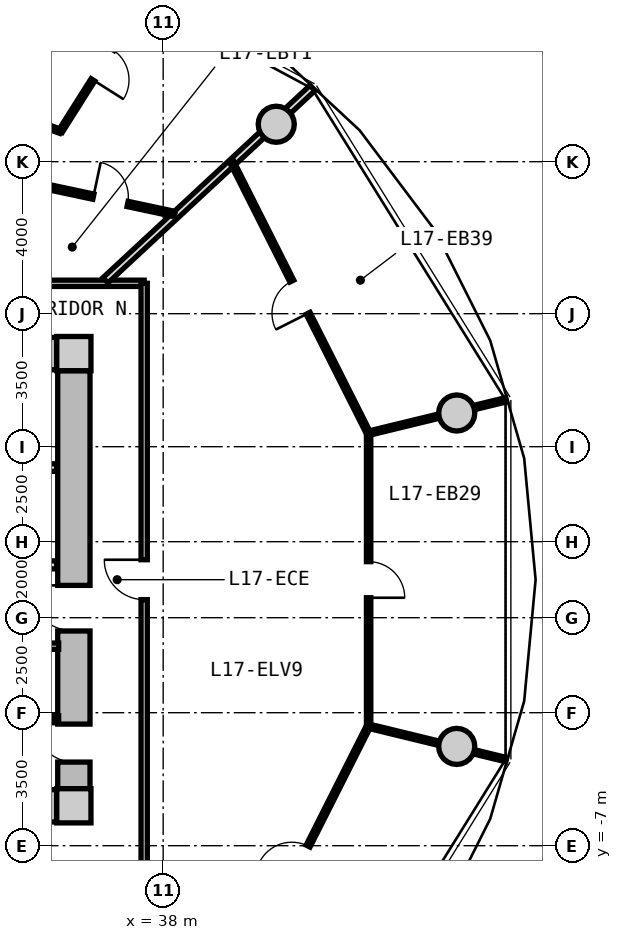
"""IFC4 building model, lengths in metres.
Left out: names, types, materials, properties, quantities, classifications, styles, units other than length and angle.
Written with IfcOpenShell. Run it as: python <this file> out.ifc"""

import sys

from ifc_helpers import new_model, si_unit, direction, frame, frame_2d, origin, origin_2d, place, context, subcontext, project, spatial, rectangle, circle, extrude, source, transform, mapped, element, fill, save


model = new_model("IFC4")
c1 = context("Model", 3, precision=1e-05, world=origin(), true_north=direction((0.0, 1.0)))
c2 = subcontext(c1, "Body", "Model", "MODEL_VIEW")
j1 = project(units=[si_unit("LENGTHUNIT", "METRE"), si_unit("PLANEANGLEUNIT", "RADIAN")], contexts=[c1])
p1 = place(None, origin())
s1 = spatial("IfcSite", under=j1, at=p1, CompositionType="ELEMENT")
p2 = place(p1, origin())
s2 = spatial("IfcBuilding", under=s1, at=p2, CompositionType="ELEMENT")
p3 = place(p2, frame((0.0, 0.0, 58.2)))
s3 = spatial("IfcBuildingStorey", under=s2, at=p3, CompositionType="ELEMENT", Elevation=58.2)
m1 = source(origin(), c2, "Body", "SweptSolid", [
    extrude(rectangle(XDim=0.9, YDim=0.9, at=origin_2d()), origin(), (0.0, 0.0, 1.0), 3.05),
])
for number, where, z_axis, x_axis in (
    (1, (35.65, -5.95, 0.0), (0.0, 0.0, 1.0), (1.0, 0.0, 0.0)),
    (2, (35.65, 5.95, 0.0), (0.0, 0.0, 1.0), (1.0, 0.0, 0.0)),
):
    element("IfcColumn", number, at=place(p3, frame(where, z_axis=z_axis, x_axis=x_axis)), inside=s3, PredefinedType="COLUMN", context=c2, shape_type="MappedRepresentation", body=[
        mapped(m1, transform((0.0, 0.0, 0.0), x_axis=(1.0, 0.0, 0.0), y_axis=(0.0, 1.0, 0.0), z_axis=(0.0, 0.0, 1.0), scale=1.0)),
    ])
m2 = source(origin(), c2, "Body", "SweptSolid", [
    extrude(rectangle(XDim=14.4, YDim=0.85, at=frame_2d((7.2, 0.0))), origin(), (0.0, 0.0, 1.0), 2.79),
])
for number, where, z_axis, x_axis in (
    (3, (20.8, 5.95, 0.0), (0.0, 0.0, 1.0), (1.0, 0.0, 0.0)),
    (4, (35.2, -5.95, 0.0), (0.0, 0.0, 1.0), (-1.0, 0.0, 0.0)),
):
    element("IfcWall", number, at=place(p3, frame(where, z_axis=z_axis, x_axis=x_axis)), inside=s3, PredefinedType="SHEAR", context=c2, shape_type="MappedRepresentation", body=[
        mapped(m2, transform((0.0, 0.0, 0.0), x_axis=(1.0, 0.0, 0.0), y_axis=(0.0, 1.0, 0.0), z_axis=(0.0, 0.0, 1.0), scale=1.0)),
    ])
m3 = source(origin(), c2, "Body", "SweptSolid", [
    extrude(rectangle(XDim=11.0, YDim=0.85, at=frame_2d((5.5, 0.0))), origin(), (0.0, 0.0, 1.0), 2.79),
])
p4 = place(p3, frame((35.65, 5.5, 0.0), z_axis=(0.0, 0.0, 1.0), x_axis=(0.0, -1.0, 0.0)))
e5 = element("IfcWall", 5, at=p4, inside=s3, PredefinedType="SHEAR", context=c2, shape_type="MappedRepresentation", body=[
    mapped(m3, transform((0.0, 0.0, 0.0), x_axis=(1.0, 0.0, 0.0), y_axis=(0.0, 1.0, 0.0), z_axis=(0.0, 0.0, 1.0), scale=1.0)),
])
p5 = place(p4, frame((5.65, 0.0, 0.0)))
e6 = element("IfcOpeningElement", 6, at=p5, cuts=e5, PredefinedType="OPENING", context=c2, shape_type="SweptSolid", body=[
    extrude(rectangle(XDim=1.2, YDim=2.15, at=frame_2d((0.6, 1.075))), frame((0.0, 0.435, 0.0), z_axis=(0.0, -1.0, 0.0), x_axis=(1.0, 0.0, 0.0)), (0.0, 0.0, 1.0), 0.87),
])
p6 = place(p4, frame((9.3, 0.0, 0.0)))
e7 = element("IfcOpeningElement", 7, at=p6, cuts=e5, PredefinedType="OPENING", context=c2, shape_type="SweptSolid", body=[
    extrude(rectangle(XDim=1.0, YDim=2.1, at=frame_2d((0.5, 1.05))), frame((0.0, 0.435, 0.0), z_axis=(0.0, -1.0, 0.0), x_axis=(1.0, 0.0, 0.0)), (0.0, 0.0, 1.0), 0.87),
])
m4 = source(origin(), c2, "Body", "SweptSolid", [
    extrude(circle(Radius=0.475, at=origin_2d()), origin(), (0.0, 0.0, 1.0), 3.05),
])
for number, where, z_axis, x_axis in (
    (8, (45.725, 4.387, 0.0), (0.0, 0.0, 1.0), (1.0, 0.0, 0.0)),
    (9, (40.975, 11.985, 0.0), (0.0, 0.0, 1.0), (1.0, 0.0, 0.0)),
    (10, (45.725, -4.387, 0.0), (0.0, 0.0, 1.0), (1.0, 0.0, 0.0)),
):
    element("IfcColumn", number, at=place(p3, frame(where, z_axis=z_axis, x_axis=x_axis)), inside=s3, PredefinedType="COLUMN", context=c2, shape_type="MappedRepresentation", body=[
        mapped(m4, transform((0.0, 0.0, 0.0), x_axis=(1.0, 0.0, 0.0), y_axis=(0.0, 1.0, 0.0), z_axis=(0.0, 0.0, 1.0), scale=1.0)),
    ])
m5 = source(origin(), c2, "Body", "SweptSolid", [
    extrude(rectangle(XDim=3.2, YDim=0.2, at=frame_2d((1.6, 0.0))), origin(), (0.0, 0.0, 1.0), 2.775),
])
p7 = place(p3, frame((32.0, 2.95, 0.0), z_axis=(0.0, 0.0, 1.0), x_axis=(1.0, 0.0, 0.0)))
e11 = element("IfcWall", 11, at=p7, inside=s3, PredefinedType="PARTITIONING", context=c2, shape_type="MappedRepresentation", body=[
    mapped(m5, transform((0.0, 0.0, 0.0), x_axis=(1.0, 0.0, 0.0), y_axis=(0.0, 1.0, 0.0), z_axis=(0.0, 0.0, 1.0), scale=1.0)),
])
m6 = source(origin(), c2, "Body", "SweptSolid", [
    extrude(rectangle(XDim=6.66, YDim=0.21, at=frame_2d((3.33, 0.0))), origin(), (0.0, 0.0, 1.0), 2.775),
])
p8 = place(p3, frame((28.54, 0.39, 0.0), z_axis=(0.0, 0.0, 1.0), x_axis=(1.0, 0.0, 0.0)))
e12 = element("IfcWall", 12, at=p8, inside=s3, PredefinedType="PARTITIONING", context=c2, shape_type="MappedRepresentation", body=[
    mapped(m6, transform((0.0, 0.0, 0.0), x_axis=(1.0, 0.0, 0.0), y_axis=(0.0, 1.0, 0.0), z_axis=(0.0, 0.0, 1.0), scale=1.0)),
])
p9 = place(p8, frame((1.0, 0.0, 0.0)))
e13 = element("IfcOpeningElement", 13, at=p9, cuts=e12, PredefinedType="OPENING", context=c2, shape_type="SweptSolid", body=[
    extrude(rectangle(XDim=1.2, YDim=2.15, at=frame_2d((0.6, 1.075))), frame((0.0, 0.115, 0.0), z_axis=(0.0, -1.0, 0.0), x_axis=(1.0, 0.0, 0.0)), (0.0, 0.0, 1.0), 0.23),
])
m7 = source(origin(), c2, "Body", "SweptSolid", [
    extrude(rectangle(XDim=2.7, YDim=0.165, at=frame_2d((1.35, 0.0))), origin(), (0.0, 0.0, 1.0), 2.775),
])
p10 = place(p3, frame((32.55, -1.75, 0.0), z_axis=(0.0, 0.0, 1.0), x_axis=(1.0, 0.0, 0.0)))
e14 = element("IfcWall", 14, at=p10, inside=s3, PredefinedType="PARTITIONING", context=c2, shape_type="MappedRepresentation", body=[
    mapped(m7, transform((0.0, 0.0, 0.0), x_axis=(1.0, 0.0, 0.0), y_axis=(0.0, 1.0, 0.0), z_axis=(0.0, 0.0, 1.0), scale=1.0)),
])
p11 = place(p10, frame((0.85, 0.0, 0.0)))
e15 = element("IfcOpeningElement", 15, at=p11, cuts=e14, PredefinedType="OPENING", context=c2, shape_type="SweptSolid", body=[
    extrude(rectangle(XDim=0.925, YDim=2.1, at=frame_2d((0.462, 1.05))), frame((0.0, 0.093, 0.0), z_axis=(0.0, -1.0, 0.0), x_axis=(1.0, 0.0, 0.0)), (0.0, 0.0, 1.0), 0.185),
])
m8 = source(origin(), c2, "Body", "SweptSolid", [
    extrude(rectangle(XDim=2.7, YDim=0.14, at=frame_2d((1.35, 0.0))), origin(), (0.0, 0.0, 1.0), 2.775),
])
p12 = place(p3, frame((32.55, -3.65, 0.0), z_axis=(0.0, 0.0, 1.0), x_axis=(1.0, 0.0, 0.0)))
e16 = element("IfcWall", 16, at=p12, inside=s3, PredefinedType="PARTITIONING", context=c2, shape_type="MappedRepresentation", body=[
    mapped(m8, transform((0.0, 0.0, 0.0), x_axis=(1.0, 0.0, 0.0), y_axis=(0.0, 1.0, 0.0), z_axis=(0.0, 0.0, 1.0), scale=1.0)),
])
m9 = source(origin(), c2, "Body", "SweptSolid", [
    extrude(rectangle(XDim=19.0, YDim=0.165, at=frame_2d((9.5, 0.0))), origin(), (0.0, 0.0, 1.0), 2.775),
])
p13 = place(p3, frame((18.5, 7.8, 0.0), z_axis=(0.0, 0.0, 1.0), x_axis=(1.0, 0.0, 0.0)))
e17 = element("IfcWall", 17, at=p13, inside=s3, PredefinedType="PARTITIONING", context=c2, shape_type="MappedRepresentation", body=[
    mapped(m9, transform((0.0, 0.0, 0.0), x_axis=(1.0, 0.0, 0.0), y_axis=(0.0, 1.0, 0.0), z_axis=(0.0, 0.0, 1.0), scale=1.0)),
])
p14 = place(p13, frame((6.961, 0.0, 0.0)))
e18 = element("IfcOpeningElement", 18, at=p14, cuts=e17, PredefinedType="OPENING", context=c2, shape_type="SweptSolid", body=[
    extrude(rectangle(XDim=1.05, YDim=2.15, at=frame_2d((0.525, 1.075))), frame((0.0, 0.093, 0.0), z_axis=(0.0, -1.0, 0.0), x_axis=(1.0, 0.0, 0.0)), (0.0, 0.0, 1.0), 0.185),
])
m10 = source(origin(), c2, "Body", "SweptSolid", [
    extrude(rectangle(XDim=15.6, YDim=0.165, at=frame_2d((7.8, 0.0))), origin(), (0.0, 0.0, 1.0), 2.775),
])
p15 = place(p3, frame((37.5, 7.8, 0.0), z_axis=(0.0, 0.0, 1.0), x_axis=(0.0, -1.0, 0.0)))
e19 = element("IfcWall", 19, at=p15, inside=s3, PredefinedType="PARTITIONING", context=c2, shape_type="MappedRepresentation", body=[
    mapped(m10, transform((0.0, 0.0, 0.0), x_axis=(1.0, 0.0, 0.0), y_axis=(0.0, 1.0, 0.0), z_axis=(0.0, 0.0, 1.0), scale=1.0)),
])
p16 = place(p15, frame((7.275, 0.0, 0.0)))
e20 = element("IfcOpeningElement", 20, at=p16, cuts=e19, PredefinedType="OPENING", context=c2, shape_type="SweptSolid", body=[
    extrude(rectangle(XDim=1.05, YDim=2.15, at=frame_2d((0.525, 1.075))), frame((0.0, 0.093, 0.0), z_axis=(0.0, -1.0, 0.0), x_axis=(1.0, 0.0, 0.0)), (0.0, 0.0, 1.0), 0.185),
])
m11 = source(origin(), c2, "Body", "SweptSolid", [
    extrude(rectangle(XDim=7.435, YDim=0.19, at=frame_2d((3.717, 0.0))), origin(), (0.0, 0.0, 1.0), 2.225),
])
p17 = place(p3, frame((36.483, 7.88, 0.0), z_axis=(0.0, 0.0, 1.0), x_axis=(0.732651956848, 0.680603489652, 0.0)))
e21 = element("IfcWall", 21, at=p17, inside=s3, PredefinedType="PARTITIONING", context=c2, shape_type="MappedRepresentation", body=[
    mapped(m11, transform((0.0, 0.0, 0.0), x_axis=(1.0, 0.0, 0.0), y_axis=(0.0, 1.0, 0.0), z_axis=(0.0, 0.0, 1.0), scale=1.0)),
])
m12 = source(origin(), c2, "Body", "SweptSolid", [
    extrude(rectangle(XDim=8.018, YDim=0.115, at=frame_2d((4.009, 0.0))), origin(), (0.0, 0.0, 1.0), 2.775),
])
p18 = place(p3, frame((39.795, -11.014, 0.0), z_axis=(0.0, 0.0, 1.0), x_axis=(0.450134355233, 0.89296084026, 0.0)))
e22 = element("IfcWall", 22, at=p18, inside=s3, PredefinedType="PARTITIONING", context=c2, shape_type="MappedRepresentation", body=[
    mapped(m12, transform((0.0, 0.0, 0.0), x_axis=(1.0, 0.0, 0.0), y_axis=(0.0, 1.0, 0.0), z_axis=(0.0, 0.0, 1.0), scale=1.0)),
])
p19 = place(p18, frame((3.534, 0.0, 0.0)))
e23 = element("IfcOpeningElement", 23, at=p19, cuts=e22, PredefinedType="OPENING", context=c2, shape_type="SweptSolid", body=[
    extrude(rectangle(XDim=0.95, YDim=2.1, at=frame_2d((0.475, 1.05))), frame((0.0, 0.067, 0.0), z_axis=(0.0, -1.0, 0.0), x_axis=(1.0, 0.0, 0.0)), (0.0, 0.0, 1.0), 0.135),
])
m13 = source(origin(), c2, "Body", "SweptSolid", [
    extrude(rectangle(XDim=7.709, YDim=0.115, at=frame_2d((3.855, 0.0))), origin(), (0.0, 0.0, 1.0), 2.775),
])
p20 = place(p3, frame((43.406, -3.855, 0.0), z_axis=(0.0, 0.0, 1.0), x_axis=(0.0, 1.0, 0.0)))
e24 = element("IfcWall", 24, at=p20, inside=s3, PredefinedType="PARTITIONING", context=c2, shape_type="MappedRepresentation", body=[
    mapped(m13, transform((0.0, 0.0, 0.0), x_axis=(1.0, 0.0, 0.0), y_axis=(0.0, 1.0, 0.0), z_axis=(0.0, 0.0, 1.0), scale=1.0)),
])
p21 = place(p20, frame((3.38, 0.0, 0.0)))
e25 = element("IfcOpeningElement", 25, at=p21, cuts=e24, PredefinedType="OPENING", context=c2, shape_type="SweptSolid", body=[
    extrude(rectangle(XDim=0.95, YDim=2.1, at=frame_2d((0.475, 1.05))), frame((0.0, 0.067, 0.0), z_axis=(0.0, -1.0, 0.0), x_axis=(1.0, 0.0, 0.0)), (0.0, 0.0, 1.0), 0.135),
])
m14 = source(origin(), c2, "Body", "SweptSolid", [
    extrude(rectangle(XDim=3.728, YDim=0.115, at=frame_2d((1.864, 0.0))), origin(), (0.0, 0.0, 1.0), 2.225),
])
p22 = place(p3, frame((43.406, -3.855, 0.0), z_axis=(0.0, 0.0, 1.0), x_axis=(0.971641177968, -0.236460189624, 0.0)))
e26 = element("IfcWall", 26, at=p22, inside=s3, PredefinedType="PARTITIONING", context=c2, shape_type="MappedRepresentation", body=[
    mapped(m14, transform((0.0, 0.0, 0.0), x_axis=(1.0, 0.0, 0.0), y_axis=(0.0, 1.0, 0.0), z_axis=(0.0, 0.0, 1.0), scale=1.0)),
])
p23 = place(p3, frame((43.404, 3.854, 0.0), z_axis=(0.0, 0.0, 1.0), x_axis=(-0.450134355233, 0.89296084026, 0.0)))
e27 = element("IfcWall", 27, at=p23, inside=s3, PredefinedType="PARTITIONING", context=c2, shape_type="MappedRepresentation", body=[
    mapped(m12, transform((0.0, 0.0, 0.0), x_axis=(1.0, 0.0, 0.0), y_axis=(0.0, 1.0, 0.0), z_axis=(0.0, 0.0, 1.0), scale=1.0)),
])
p24 = place(p23, frame((3.534, 0.0, 0.0)))
e28 = element("IfcOpeningElement", 28, at=p24, cuts=e27, PredefinedType="OPENING", context=c2, shape_type="SweptSolid", body=[
    extrude(rectangle(XDim=0.95, YDim=2.1, at=frame_2d((0.475, 1.05))), frame((0.0, 0.067, 0.0), z_axis=(0.0, -1.0, 0.0), x_axis=(1.0, 0.0, 0.0)), (0.0, 0.0, 1.0), 0.135),
])
m15 = source(origin(), c2, "Body", "SweptSolid", [
    extrude(rectangle(XDim=3.73, YDim=0.115, at=frame_2d((1.865, 0.0))), origin(), (0.0, 0.0, 1.0), 2.225),
])
p25 = place(p3, frame((43.404, 3.854, 0.0), z_axis=(0.0, 0.0, 1.0), x_axis=(0.971644038568, 0.236448434791, 0.0)))
e29 = element("IfcWall", 29, at=p25, inside=s3, PredefinedType="PARTITIONING", context=c2, shape_type="MappedRepresentation", body=[
    mapped(m15, transform((0.0, 0.0, 0.0), x_axis=(1.0, 0.0, 0.0), y_axis=(0.0, 1.0, 0.0), z_axis=(0.0, 0.0, 1.0), scale=1.0)),
])
m16 = source(origin(), c2, "Body", "SweptSolid", [
    extrude(rectangle(XDim=3.459, YDim=0.14, at=frame_2d((1.729, 0.0))), origin(), (0.0, 0.0, 1.0), 2.775),
])
p26 = place(p3, frame((34.922, 10.344, 0.0), z_axis=(0.0, 0.0, 1.0), x_axis=(0.978006468578, -0.208574560815, 0.0)))
e30 = element("IfcWall", 30, at=p26, inside=s3, PredefinedType="PARTITIONING", context=c2, shape_type="MappedRepresentation", body=[
    mapped(m16, transform((0.0, 0.0, 0.0), x_axis=(1.0, 0.0, 0.0), y_axis=(0.0, 1.0, 0.0), z_axis=(0.0, 0.0, 1.0), scale=1.0)),
])
p27 = place(p26, frame((1.27, 0.0, 0.0)))
e31 = element("IfcOpeningElement", 31, at=p27, cuts=e30, PredefinedType="OPENING", context=c2, shape_type="SweptSolid", body=[
    extrude(rectangle(XDim=0.92, YDim=2.1, at=frame_2d((0.46, 1.05))), frame((0.0, 0.08, 0.0), z_axis=(0.0, -1.0, 0.0), x_axis=(1.0, 0.0, 0.0)), (0.0, 0.0, 1.0), 0.16),
])
m17 = source(origin(), c2, "Body", "SweptSolid", [
    extrude(rectangle(XDim=4.15, YDim=0.115, at=frame_2d((2.075, 0.0))), origin(), (0.0, 0.0, 1.0), 2.775),
])
p28 = place(p3, frame((35.296, 11.801, 0.0), z_axis=(0.0, 0.0, 1.0), x_axis=(0.534475378192, 0.845184045109, 0.0)))
e32 = element("IfcWall", 32, at=p28, inside=s3, PredefinedType="PARTITIONING", context=c2, shape_type="MappedRepresentation", body=[
    mapped(m17, transform((0.0, 0.0, 0.0), x_axis=(1.0, 0.0, 0.0), y_axis=(0.0, 1.0, 0.0), z_axis=(0.0, 0.0, 1.0), scale=1.0)),
])
p29 = place(p28, frame((1.6, 0.0, 0.0)))
e33 = element("IfcOpeningElement", 33, at=p29, cuts=e32, PredefinedType="OPENING", context=c2, shape_type="SweptSolid", body=[
    extrude(rectangle(XDim=0.95, YDim=2.1, at=frame_2d((0.475, 1.05))), frame((0.0, 0.067, 0.0), z_axis=(0.0, -1.0, 0.0), x_axis=(1.0, 0.0, 0.0)), (0.0, 0.0, 1.0), 0.135),
])
m18 = source(origin(), c2, "Body", "SweptSolid", [
    extrude(rectangle(XDim=3.765, YDim=0.115, at=frame_2d((1.882, 0.0))), origin(), (0.0, 0.0, 1.0), 2.775),
])
p30 = place(p3, frame((35.296, 11.801, 0.0), z_axis=(0.0, 0.0, 1.0), x_axis=(-0.943788572669, 0.330549739222, 0.0)))
e34 = element("IfcWall", 34, at=p30, inside=s3, PredefinedType="PARTITIONING", context=c2, shape_type="MappedRepresentation", body=[
    mapped(m18, transform((0.0, 0.0, 0.0), x_axis=(1.0, 0.0, 0.0), y_axis=(0.0, 1.0, 0.0), z_axis=(0.0, 0.0, 1.0), scale=1.0)),
])
m19 = source(origin(), c2, "Body", "SweptSolid", [
    extrude(rectangle(XDim=1.2, YDim=2.15, at=frame_2d((0.6, 1.075))), frame((0.0, 0.025, 0.0), z_axis=(0.0, -1.0, 0.0), x_axis=(1.0, 0.0, 0.0)), (0.0, 0.0, 1.0), 0.05),
])
p31 = place(p5, frame((1.2, 0.0, 0.0), z_axis=(0.0, 0.0, 1.0), x_axis=(-1.0, 0.0, 0.0)))
e35 = element("IfcDoor", 35, at=p31, inside=s3, OperationType="SINGLE_SWING_RIGHT", PredefinedType="DOOR", context=c2, shape_type="MappedRepresentation", body=[
    mapped(m19, transform((0.0, 0.0, 0.0), x_axis=(1.0, 0.0, 0.0), y_axis=(0.0, 1.0, 0.0), z_axis=(0.0, 0.0, 1.0), scale=1.0)),
])
fill(e6, e35)
m20 = source(origin(), c2, "Body", "SweptSolid", [
    extrude(rectangle(XDim=1.0, YDim=2.1, at=frame_2d((0.5, 1.05))), frame((0.0, 0.025, 0.0), z_axis=(0.0, -1.0, 0.0), x_axis=(1.0, 0.0, 0.0)), (0.0, 0.0, 1.0), 0.05),
])
p32 = place(p6, frame((1.0, 0.0, 0.0), z_axis=(0.0, 0.0, 1.0), x_axis=(-1.0, 0.0, 0.0)))
e36 = element("IfcDoor", 36, at=p32, inside=s3, OperationType="SINGLE_SWING_RIGHT", PredefinedType="DOOR", context=c2, shape_type="MappedRepresentation", body=[
    mapped(m20, transform((0.0, 0.0, 0.0), x_axis=(1.0, 0.0, 0.0), y_axis=(0.0, 1.0, 0.0), z_axis=(0.0, 0.0, 1.0), scale=1.0)),
])
fill(e7, e36)
m21 = source(origin(), c2, "Body", "SweptSolid", [
    extrude(rectangle(XDim=1.05, YDim=2.15, at=frame_2d((0.525, 1.075))), frame((0.0, 0.025, 0.0), z_axis=(0.0, -1.0, 0.0), x_axis=(1.0, 0.0, 0.0)), (0.0, 0.0, 1.0), 0.05),
])
p33 = place(p16, frame((1.05, 0.0, 0.0), z_axis=(0.0, 0.0, 1.0), x_axis=(-1.0, 0.0, 0.0)))
e37 = element("IfcDoor", 37, at=p33, inside=s3, OperationType="SINGLE_SWING_RIGHT", PredefinedType="DOOR", context=c2, shape_type="MappedRepresentation", body=[
    mapped(m21, transform((0.0, 0.0, 0.0), x_axis=(1.0, 0.0, 0.0), y_axis=(0.0, 1.0, 0.0), z_axis=(0.0, 0.0, 1.0), scale=1.0)),
])
fill(e20, e37)
m22 = source(origin(), c2, "Body", "SweptSolid", [
    extrude(rectangle(XDim=0.95, YDim=2.1, at=frame_2d((0.475, 1.05))), frame((0.0, 0.025, 0.0), z_axis=(0.0, -1.0, 0.0), x_axis=(1.0, 0.0, 0.0)), (0.0, 0.0, 1.0), 0.05),
])
p34 = place(p19, origin())
e38 = element("IfcDoor", 38, at=p34, inside=s3, OperationType="SINGLE_SWING_LEFT", PredefinedType="DOOR", context=c2, shape_type="MappedRepresentation", body=[
    mapped(m22, transform((0.0, 0.0, 0.0), x_axis=(1.0, 0.0, 0.0), y_axis=(0.0, 1.0, 0.0), z_axis=(0.0, 0.0, 1.0), scale=1.0)),
])
fill(e23, e38)
p35 = place(p21, frame((0.95, 0.0, 0.0), z_axis=(0.0, 0.0, 1.0), x_axis=(-1.0, 0.0, 0.0)))
e39 = element("IfcDoor", 39, at=p35, inside=s3, OperationType="SINGLE_SWING_RIGHT", PredefinedType="DOOR", context=c2, shape_type="MappedRepresentation", body=[
    mapped(m22, transform((0.0, 0.0, 0.0), x_axis=(1.0, 0.0, 0.0), y_axis=(0.0, 1.0, 0.0), z_axis=(0.0, 0.0, 1.0), scale=1.0)),
])
fill(e25, e39)
p36 = place(p24, origin())
e40 = element("IfcDoor", 40, at=p36, inside=s3, OperationType="SINGLE_SWING_LEFT", PredefinedType="DOOR", context=c2, shape_type="MappedRepresentation", body=[
    mapped(m22, transform((0.0, 0.0, 0.0), x_axis=(1.0, 0.0, 0.0), y_axis=(0.0, 1.0, 0.0), z_axis=(0.0, 0.0, 1.0), scale=1.0)),
])
fill(e28, e40)
m23 = source(origin(), c2, "Body", "SweptSolid", [
    extrude(rectangle(XDim=0.92, YDim=2.1, at=frame_2d((0.46, 1.05))), frame((0.0, 0.025, 0.0), z_axis=(0.0, -1.0, 0.0), x_axis=(1.0, 0.0, 0.0)), (0.0, 0.0, 1.0), 0.05),
])
p37 = place(p27, origin())
e41 = element("IfcDoor", 41, at=p37, inside=s3, OperationType="SINGLE_SWING_LEFT", PredefinedType="DOOR", context=c2, shape_type="MappedRepresentation", body=[
    mapped(m23, transform((0.0, 0.0, 0.0), x_axis=(1.0, 0.0, 0.0), y_axis=(0.0, 1.0, 0.0), z_axis=(0.0, 0.0, 1.0), scale=1.0)),
])
fill(e31, e41)
p38 = place(p29, frame((0.95, 0.0, 0.0), z_axis=(0.0, 0.0, 1.0), x_axis=(-1.0, 0.0, 0.0)))
e42 = element("IfcDoor", 42, at=p38, inside=s3, OperationType="SINGLE_SWING_RIGHT", PredefinedType="DOOR", context=c2, shape_type="MappedRepresentation", body=[
    mapped(m22, transform((0.0, 0.0, 0.0), x_axis=(1.0, 0.0, 0.0), y_axis=(0.0, 1.0, 0.0), z_axis=(0.0, 0.0, 1.0), scale=1.0)),
])
fill(e33, e42)
save(model, sys.argv[1])
